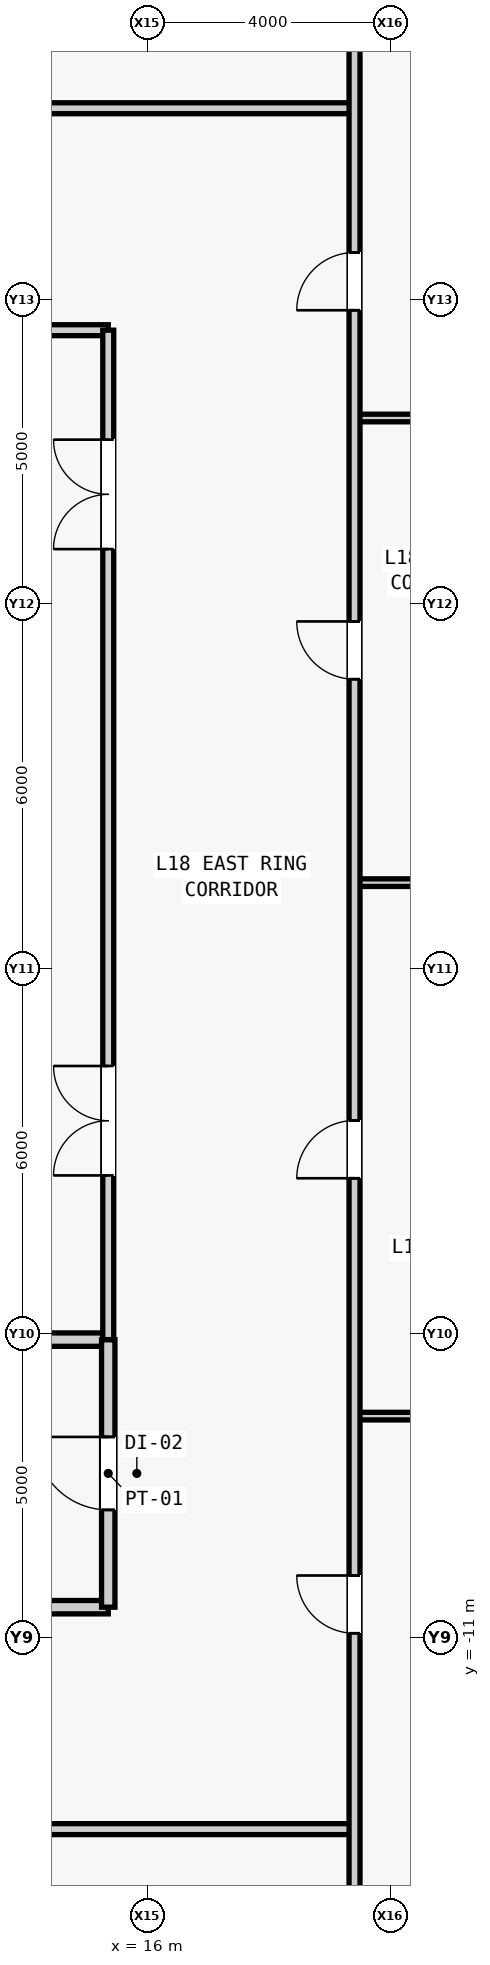
"""IFC4 building model, lengths in metres.
Left out: names, types, materials, properties, quantities, classifications, styles, units other than length and angle.
Written with IfcOpenShell. Run it as: python <this file> out.ifc"""

import sys

from ifc_helpers import new_model, si_unit, direction, frame, frame_2d, origin, place, context, subcontext, project, spatial, rectangle, extrude, source, transform, mapped, element, fill, save


model = new_model("IFC4")
c1 = context("Model", 3, precision=1e-05, world=origin(), true_north=direction((0.0, 1.0)))
c2 = subcontext(c1, "Body", "Model", "MODEL_VIEW")
j1 = project(units=[si_unit("LENGTHUNIT", "METRE"), si_unit("PLANEANGLEUNIT", "RADIAN")], contexts=[c1])
p1 = place(None, origin())
s1 = spatial("IfcSite", under=j1, at=p1, CompositionType="ELEMENT")
p2 = place(p1, origin())
s2 = spatial("IfcBuilding", under=s1, at=p2, CompositionType="ELEMENT")
p3 = place(p2, frame((0.0, 0.0, 83.0)))
s3 = spatial("IfcBuildingStorey", under=s2, at=p3, CompositionType="ELEMENT", Elevation=83.0)
m1 = source(origin(), c2, "Body", "SweptSolid", [
    extrude(rectangle(XDim=4.05, YDim=0.22, at=frame_2d((2.025, 0.0))), origin(), (0.0, 0.0, 1.0), 3.94),
])
p4 = place(p3, frame((11.3, -10.5, 0.0), z_axis=(0.0, 0.0, 1.0), x_axis=(1.0, 0.0, 0.0)))
e1 = element("IfcWall", 1, at=p4, inside=s3, PredefinedType="PARTITIONING", context=c2, shape_type="MappedRepresentation", body=[
    mapped(m1, transform((0.0, 0.0, 0.0), scale=1.0)),
])
m2 = source(origin(), c2, "Body", "SweptSolid", [
    extrude(rectangle(XDim=4.05, YDim=0.22, at=frame_2d((2.025, 0.0))), origin(), (0.0, 0.0, 1.0), 3.085),
])
p5 = place(p3, frame((11.3, -6.1, 0.0), z_axis=(0.0, 0.0, 1.0), x_axis=(1.0, 0.0, 0.0)))
e2 = element("IfcWall", 2, at=p5, inside=s3, PredefinedType="PARTITIONING", context=c2, shape_type="MappedRepresentation", body=[
    mapped(m2, transform((0.0, 0.0, 0.0), scale=1.0)),
])
m3 = source(origin(), c2, "Body", "SweptSolid", [
    extrude(rectangle(XDim=4.4, YDim=0.22, at=frame_2d((2.2, 0.0))), origin(), (0.0, 0.0, 1.0), 3.94),
])
p6 = place(p3, frame((15.35, -10.5, 0.0), z_axis=(0.0, 0.0, 1.0), x_axis=(0.0, 1.0, 0.0)))
e3 = element("IfcWall", 3, at=p6, inside=s3, PredefinedType="PARTITIONING", context=c2, shape_type="MappedRepresentation", body=[
    mapped(m3, transform((0.0, 0.0, 0.0), scale=1.0)),
])
m4 = source(origin(), c2, "Body", "SweptSolid", [
    extrude(rectangle(XDim=1.2, YDim=2.2, at=frame_2d((0.6, 1.1))), frame((0.0, 0.12, 0.0), z_axis=(0.0, -1.0, 0.0), x_axis=(1.0, 0.0, 0.0)), (0.0, 0.0, 1.0), 0.24),
])
p7 = place(p6, frame((1.6, 0.0, 0.0)))
e4 = element("IfcOpeningElement", 4, at=p7, cuts=e3, PredefinedType="OPENING", context=c2, shape_type="MappedRepresentation", body=[
    mapped(m4, transform((0.0, 0.0, 0.0), scale=1.0)),
])
m5 = source(origin(), c2, "Body", "SweptSolid", [
    extrude(rectangle(XDim=4.05, YDim=0.18, at=frame_2d((2.025, 0.0))), origin(), (0.0, 0.0, 1.0), 3.94),
])
p8 = place(p3, frame((11.3, 10.5, 0.0), z_axis=(0.0, 0.0, 1.0), x_axis=(1.0, 0.0, 0.0)))
e5 = element("IfcWall", 5, at=p8, inside=s3, PredefinedType="PARTITIONING", context=c2, shape_type="MappedRepresentation", body=[
    mapped(m5, transform((0.0, 0.0, 0.0), scale=1.0)),
])
m6 = source(origin(), c2, "Body", "SweptSolid", [
    extrude(rectangle(XDim=16.6, YDim=0.18, at=frame_2d((8.3, 0.0))), origin(), (0.0, 0.0, 1.0), 3.94),
])
p9 = place(p3, frame((15.35, -6.1, 0.0), z_axis=(0.0, 0.0, 1.0), x_axis=(0.0, 1.0, 0.0)))
e6 = element("IfcWall", 6, at=p9, inside=s3, PredefinedType="PARTITIONING", context=c2, shape_type="MappedRepresentation", body=[
    mapped(m6, transform((0.0, 0.0, 0.0), scale=1.0)),
])
m7 = source(origin(), c2, "Body", "SweptSolid", [
    extrude(rectangle(XDim=1.8, YDim=2.25, at=frame_2d((0.9, 1.125))), frame((0.0, 0.1, 0.0), z_axis=(0.0, -1.0, 0.0), x_axis=(1.0, 0.0, 0.0)), (0.0, 0.0, 1.0), 0.2),
])
p10 = place(p9, frame((2.7, 0.0, 0.0)))
e7 = element("IfcOpeningElement", 7, at=p10, cuts=e6, PredefinedType="OPENING", context=c2, shape_type="MappedRepresentation", body=[
    mapped(m7, transform((0.0, 0.0, 0.0), scale=1.0)),
])
p11 = place(p9, frame((13.0, 0.0, 0.0)))
e8 = element("IfcOpeningElement", 8, at=p11, cuts=e6, PredefinedType="OPENING", context=c2, shape_type="MappedRepresentation", body=[
    mapped(m7, transform((0.0, 0.0, 0.0), scale=1.0)),
])
m8 = source(origin(), c2, "Body", "SweptSolid", [
    extrude(rectangle(XDim=37.95, YDim=0.18, at=frame_2d((18.975, 0.0))), origin(), (0.0, 0.0, 1.0), 3.94),
])
p12 = place(p3, frame((-18.55, -14.15, 0.0), z_axis=(0.0, 0.0, 1.0), x_axis=(1.0, 0.0, 0.0)))
e9 = element("IfcWall", 9, at=p12, inside=s3, PredefinedType="PARTITIONING", context=c2, shape_type="MappedRepresentation", body=[
    mapped(m8, transform((0.0, 0.0, 0.0), scale=1.0)),
])
m9 = source(origin(), c2, "Body", "SweptSolid", [
    extrude(rectangle(XDim=1.05, YDim=2.2, at=frame_2d((0.525, 1.1))), frame((0.0, 0.1, 0.0), z_axis=(0.0, -1.0, 0.0), x_axis=(1.0, 0.0, 0.0)), (0.0, 0.0, 1.0), 0.2),
])
p13 = place(p12, frame((4.966, 0.0, 0.0)))
e10 = element("IfcOpeningElement", 10, at=p13, cuts=e9, PredefinedType="OPENING", context=c2, shape_type="MappedRepresentation", body=[
    mapped(m9, transform((0.0, 0.0, 0.0), scale=1.0)),
])
p14 = place(p12, frame((10.291, 0.0, 0.0)))
e11 = element("IfcOpeningElement", 11, at=p14, cuts=e9, PredefinedType="OPENING", context=c2, shape_type="MappedRepresentation", body=[
    mapped(m9, transform((0.0, 0.0, 0.0), scale=1.0)),
])
p15 = place(p12, frame((18.64, 0.0, 0.0)))
e12 = element("IfcOpeningElement", 12, at=p15, cuts=e9, PredefinedType="OPENING", context=c2, shape_type="MappedRepresentation", body=[
    mapped(m9, transform((0.0, 0.0, 0.0), scale=1.0)),
])
p16 = place(p12, frame((27.178, 0.0, 0.0)))
e13 = element("IfcOpeningElement", 13, at=p16, cuts=e9, PredefinedType="OPENING", context=c2, shape_type="MappedRepresentation", body=[
    mapped(m9, transform((0.0, 0.0, 0.0), scale=1.0)),
])
p17 = place(p3, frame((-18.55, 14.15, 0.0), z_axis=(0.0, 0.0, 1.0), x_axis=(1.0, 0.0, 0.0)))
e14 = element("IfcWall", 14, at=p17, inside=s3, PredefinedType="PARTITIONING", context=c2, shape_type="MappedRepresentation", body=[
    mapped(m8, transform((0.0, 0.0, 0.0), scale=1.0)),
])
p18 = place(p17, frame((7.242, 0.0, 0.0)))
e15 = element("IfcOpeningElement", 15, at=p18, cuts=e14, PredefinedType="OPENING", context=c2, shape_type="MappedRepresentation", body=[
    mapped(m9, transform((0.0, 0.0, 0.0), scale=1.0)),
])
p19 = place(p17, frame((17.691, 0.0, 0.0)))
e16 = element("IfcOpeningElement", 16, at=p19, cuts=e14, PredefinedType="OPENING", context=c2, shape_type="MappedRepresentation", body=[
    mapped(m9, transform((0.0, 0.0, 0.0), scale=1.0)),
])
p20 = place(p17, frame((28.473, 0.0, 0.0)))
e17 = element("IfcOpeningElement", 17, at=p20, cuts=e14, PredefinedType="OPENING", context=c2, shape_type="MappedRepresentation", body=[
    mapped(m9, transform((0.0, 0.0, 0.0), scale=1.0)),
])
m10 = source(origin(), c2, "Body", "SweptSolid", [
    extrude(rectangle(XDim=12.6, YDim=0.125, at=frame_2d((6.3, 0.0))), origin(), (0.0, 0.0, 1.0), 3.94),
])
for number, where, z_axis, x_axis in (
    (18, (19.4, -7.358, 0.0), (0.0, 0.0, 1.0), (1.0, 0.0, 0.0)),
    (19, (19.4, 1.415, 0.0), (0.0, 0.0, 1.0), (1.0, 0.0, 0.0)),
    (20, (19.4, 9.056, 0.0), (0.0, 0.0, 1.0), (1.0, 0.0, 0.0)),
):
    element("IfcWall", number, at=place(p3, frame(where, z_axis=z_axis, x_axis=x_axis)), inside=s3, PredefinedType="PARTITIONING", context=c2, shape_type="MappedRepresentation", body=[
        mapped(m10, transform((0.0, 0.0, 0.0), scale=1.0)),
    ])
m11 = source(origin(), c2, "Body", "SweptSolid", [
    extrude(rectangle(XDim=57.0, YDim=0.18, at=frame_2d((28.5, 0.0))), origin(), (0.0, 0.0, 1.0), 3.471),
])
p21 = place(p3, frame((19.4, -28.5, 0.0), z_axis=(0.0, 0.0, 1.0), x_axis=(0.0, 1.0, 0.0)))
e21 = element("IfcWall", 21, at=p21, inside=s3, PredefinedType="PARTITIONING", context=c2, shape_type="MappedRepresentation", body=[
    mapped(m11, transform((0.0, 0.0, 0.0), scale=1.0)),
])
m12 = source(origin(), c2, "Body", "SweptSolid", [
    extrude(rectangle(XDim=0.95, YDim=2.15, at=frame_2d((0.475, 1.075))), frame((0.0, 0.1, 0.0), z_axis=(0.0, -1.0, 0.0), x_axis=(1.0, 0.0, 0.0)), (0.0, 0.0, 1.0), 0.2),
])
p22 = place(p21, frame((17.571, 0.0, 0.0)))
e22 = element("IfcOpeningElement", 22, at=p22, cuts=e21, PredefinedType="OPENING", context=c2, shape_type="MappedRepresentation", body=[
    mapped(m12, transform((0.0, 0.0, 0.0), scale=1.0)),
])
p23 = place(p21, frame((25.053, 0.0, 0.0)))
e23 = element("IfcOpeningElement", 23, at=p23, cuts=e21, PredefinedType="OPENING", context=c2, shape_type="MappedRepresentation", body=[
    mapped(m12, transform((0.0, 0.0, 0.0), scale=1.0)),
])
p24 = place(p21, frame((33.26, 0.0, 0.0)))
e24 = element("IfcOpeningElement", 24, at=p24, cuts=e21, PredefinedType="OPENING", context=c2, shape_type="MappedRepresentation", body=[
    mapped(m12, transform((0.0, 0.0, 0.0), scale=1.0)),
])
p25 = place(p21, frame((39.328, 0.0, 0.0)))
e25 = element("IfcOpeningElement", 25, at=p25, cuts=e21, PredefinedType="OPENING", context=c2, shape_type="MappedRepresentation", body=[
    mapped(m12, transform((0.0, 0.0, 0.0), scale=1.0)),
])
m13 = source(origin(), c2, "Body", "SweptSolid", [
    extrude(rectangle(XDim=1.2, YDim=2.2, at=frame_2d((0.6, 1.1))), frame((0.0, 0.025, 0.0), z_axis=(0.0, -1.0, 0.0), x_axis=(1.0, 0.0, 0.0)), (0.0, 0.0, 1.0), 0.05),
])
p26 = place(p7, origin())
e26 = element("IfcDoor", 26, at=p26, inside=s3, OperationType="SINGLE_SWING_RIGHT", PredefinedType="DOOR", context=c2, shape_type="MappedRepresentation", body=[
    mapped(m13, transform((0.0, 0.0, 0.0), scale=1.0)),
])
fill(e4, e26)
m14 = source(origin(), c2, "Body", "SweptSolid", [
    extrude(rectangle(XDim=1.8, YDim=2.25, at=frame_2d((0.9, 1.125))), frame((0.0, 0.025, 0.0), z_axis=(0.0, -1.0, 0.0), x_axis=(1.0, 0.0, 0.0)), (0.0, 0.0, 1.0), 0.05),
])
p27 = place(p10, origin())
e27 = element("IfcDoor", 27, at=p27, inside=s3, OperationType="SINGLE_SWING_RIGHT", PredefinedType="DOOR", context=c2, shape_type="MappedRepresentation", body=[
    mapped(m14, transform((0.0, 0.0, 0.0), scale=1.0)),
])
fill(e7, e27)
p28 = place(p11, origin())
e28 = element("IfcDoor", 28, at=p28, inside=s3, OperationType="SINGLE_SWING_LEFT", PredefinedType="DOOR", context=c2, shape_type="MappedRepresentation", body=[
    mapped(m14, transform((0.0, 0.0, 0.0), scale=1.0)),
])
fill(e8, e28)
m15 = source(origin(), c2, "Body", "SweptSolid", [
    extrude(rectangle(XDim=0.95, YDim=2.15, at=frame_2d((0.475, 1.075))), frame((0.0, 0.025, 0.0), z_axis=(0.0, -1.0, 0.0), x_axis=(1.0, 0.0, 0.0)), (0.0, 0.0, 1.0), 0.05),
])
p29 = place(p22, origin())
e29 = element("IfcDoor", 29, at=p29, inside=s3, OperationType="SINGLE_SWING_RIGHT", PredefinedType="DOOR", context=c2, shape_type="MappedRepresentation", body=[
    mapped(m15, transform((0.0, 0.0, 0.0), scale=1.0)),
])
fill(e22, e29)
p30 = place(p23, origin())
e30 = element("IfcDoor", 30, at=p30, inside=s3, OperationType="SINGLE_SWING_LEFT", PredefinedType="DOOR", context=c2, shape_type="MappedRepresentation", body=[
    mapped(m15, transform((0.0, 0.0, 0.0), scale=1.0)),
])
fill(e23, e30)
p31 = place(p24, origin())
e31 = element("IfcDoor", 31, at=p31, inside=s3, OperationType="SINGLE_SWING_RIGHT", PredefinedType="DOOR", context=c2, shape_type="MappedRepresentation", body=[
    mapped(m15, transform((0.0, 0.0, 0.0), scale=1.0)),
])
fill(e24, e31)
p32 = place(p25, origin())
e32 = element("IfcDoor", 32, at=p32, inside=s3, OperationType="SINGLE_SWING_LEFT", PredefinedType="DOOR", context=c2, shape_type="MappedRepresentation", body=[
    mapped(m15, transform((0.0, 0.0, 0.0), scale=1.0)),
])
fill(e25, e32)
save(model, sys.argv[1])
